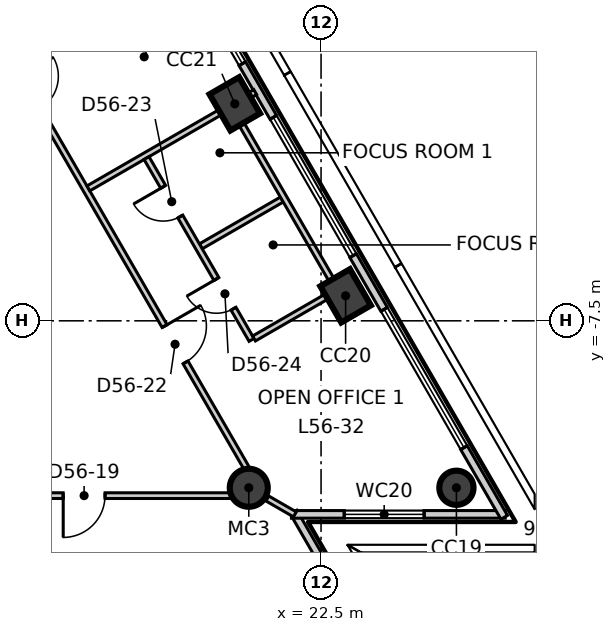
"""IFC4 building model, lengths in metres.
Left out: names, types, materials, properties, quantities, classifications, styles, units other than length and angle.
Written with IfcOpenShell. Run it as: python <this file> out.ifc"""

import sys

from ifc_helpers import new_model, si_unit, direction, frame, frame_2d, origin, origin_2d, place, context, subcontext, project, spatial, rectangle, circle, extrude, element, fill, save


model = new_model("IFC4")
c1 = context("Model", 3, precision=1e-05, world=origin(), true_north=direction((0.0, 1.0)))
c2 = subcontext(c1, "Body", "Model", "MODEL_VIEW")
j1 = project(units=[si_unit("LENGTHUNIT", "METRE"), si_unit("PLANEANGLEUNIT", "RADIAN")], contexts=[c1])
p1 = place(None, origin())
s1 = spatial("IfcSite", under=j1, at=p1, CompositionType="ELEMENT")
p2 = place(p1, origin())
s2 = spatial("IfcBuilding", under=s1, at=p2, CompositionType="ELEMENT")
p3 = place(p2, frame((0.0, 0.0, 239.3)))
s3 = spatial("IfcBuildingStorey", under=s2, at=p3, CompositionType="ELEMENT", Elevation=239.3)
p4 = place(p3, frame((26.062, -11.893, -0.3), z_axis=(0.0, 0.0, 1.0), x_axis=(-0.5, 0.866025403784, 0.0)))
e1 = element("IfcColumn", 1, at=p4, inside=s3, PredefinedType="COLUMN", context=c2, shape_type="SweptSolid", body=[
    extrude(circle(Radius=0.45, at=origin_2d()), origin(), (0.0, 0.0, 1.0), 4.0),
])
for number, where, z_axis, x_axis in (
    (2, (23.146, -6.842, -0.3), (0.0, 0.0, 1.0), (-0.5, 0.866, 0.0)),
    (3, (20.23, -1.791, -0.3), (0.0, 0.0, 1.0), (-0.5, 0.866, 0.0)),
):
    element("IfcColumn", number, at=place(p3, frame(where, z_axis=z_axis, x_axis=x_axis)), inside=s3, PredefinedType="COLUMN", context=c2, shape_type="SweptSolid", body=[
        extrude(rectangle(XDim=1.1, YDim=0.9, at=origin_2d()), origin(), (0.0, 0.0, 1.0), 4.0),
    ])
p5 = place(p3, frame((20.598, -11.893, -0.3), z_axis=(0.0, 0.0, 1.0), x_axis=(1.0, 0.0, 0.0)))
e4 = element("IfcColumn", 4, at=p5, inside=s3, PredefinedType="COLUMN", context=c2, shape_type="SweptSolid", body=[
    extrude(circle(Radius=0.5, at=origin_2d()), origin(), (0.0, 0.0, 1.0), 4.0),
])
p6 = place(p3, frame((24.588, -17.402, 0.0), z_axis=(0.0, 0.0, 1.0), x_axis=(-0.500033107516, 0.866006288307, 0.0)))
e5 = element("IfcWall", 5, at=p6, inside=s3, PredefinedType="ELEMENTEDWALL", context=c2, shape_type="SweptSolid", body=[
    extrude(rectangle(XDim=5.624, YDim=0.2, at=frame_2d((2.812, 0.0))), origin(), (0.0, 0.0, 1.0), 3.7),
])
p7 = place(p6, frame((1.99, 0.0, 0.9)))
e6 = element("IfcOpeningElement", 6, at=p7, cuts=e5, PredefinedType="OPENING", context=c2, shape_type="SweptSolid", body=[
    extrude(rectangle(XDim=2.1, YDim=2.5, at=frame_2d((1.05, 1.25))), frame((0.0, 0.11, 0.0), z_axis=(0.0, -1.0, 0.0), x_axis=(1.0, 0.0, 0.0)), (0.0, 0.0, 1.0), 0.22),
])
p8 = place(p3, frame((21.721, -12.593, 0.0), z_axis=(0.0, 0.0, 1.0), x_axis=(1.0, 0.0, 0.0)))
e7 = element("IfcWall", 7, at=p8, inside=s3, PredefinedType="ELEMENTEDWALL", context=c2, shape_type="SweptSolid", body=[
    extrude(rectangle(XDim=5.624, YDim=0.2, at=frame_2d((2.812, 0.0))), origin(), (0.0, 0.0, 1.0), 3.7),
])
p9 = place(p8, frame((1.39, 0.0, 0.9)))
e8 = element("IfcOpeningElement", 8, at=p9, cuts=e7, PredefinedType="OPENING", context=c2, shape_type="SweptSolid", body=[
    extrude(rectangle(XDim=2.1, YDim=2.5, at=frame_2d((1.05, 1.25))), frame((0.0, 0.11, 0.0), z_axis=(0.0, -1.0, 0.0), x_axis=(1.0, 0.0, 0.0)), (0.0, 0.0, 1.0), 0.22),
])
p10 = place(p3, frame((27.32, -12.671, 0.0), z_axis=(0.0, 0.0, 1.0), x_axis=(-0.499995097538, 0.866028234204, 0.0)))
e9 = element("IfcWall", 9, at=p10, inside=s3, PredefinedType="ELEMENTEDWALL", context=c2, shape_type="SweptSolid", body=[
    extrude(rectangle(XDim=49.247, YDim=0.2, at=frame_2d((24.623, 0.0))), origin(), (0.0, 0.0, 1.0), 3.7),
])
p11 = place(p10, frame((2.119, 0.0, 0.9)))
e10 = element("IfcOpeningElement", 10, at=p11, cuts=e9, PredefinedType="OPENING", context=c2, shape_type="SweptSolid", body=[
    extrude(rectangle(XDim=4.2, YDim=2.5, at=frame_2d((2.1, 1.25))), frame((0.0, 0.11, 0.0), z_axis=(0.0, -1.0, 0.0), x_axis=(1.0, 0.0, 0.0)), (0.0, 0.0, 1.0), 0.22),
])
p12 = place(p10, frame((7.952, 0.0, 0.9)))
e11 = element("IfcOpeningElement", 11, at=p12, cuts=e9, PredefinedType="OPENING", context=c2, shape_type="SweptSolid", body=[
    extrude(rectangle(XDim=4.2, YDim=2.5, at=frame_2d((2.1, 1.25))), frame((0.0, 0.11, 0.0), z_axis=(0.0, -1.0, 0.0), x_axis=(1.0, 0.0, 0.0)), (0.0, 0.0, 1.0), 0.22),
])
p13 = place(p10, frame((13.784, 0.0, 0.9)))
e12 = element("IfcOpeningElement", 12, at=p13, cuts=e9, PredefinedType="OPENING", context=c2, shape_type="SweptSolid", body=[
    extrude(rectangle(XDim=4.2, YDim=2.5, at=frame_2d((2.1, 1.25))), frame((0.0, 0.11, 0.0), z_axis=(0.0, -1.0, 0.0), x_axis=(1.0, 0.0, 0.0)), (0.0, 0.0, 1.0), 0.22),
])
p14 = place(p10, frame((19.617, 0.0, 0.9)))
e13 = element("IfcOpeningElement", 13, at=p14, cuts=e9, PredefinedType="OPENING", context=c2, shape_type="SweptSolid", body=[
    extrude(rectangle(XDim=4.2, YDim=2.5, at=frame_2d((2.1, 1.25))), frame((0.0, 0.11, 0.0), z_axis=(0.0, -1.0, 0.0), x_axis=(1.0, 0.0, 0.0)), (0.0, 0.0, 1.0), 0.22),
])
p15 = place(p10, frame((25.45, 0.0, 0.9)))
e14 = element("IfcOpeningElement", 14, at=p15, cuts=e9, PredefinedType="OPENING", context=c2, shape_type="SweptSolid", body=[
    extrude(rectangle(XDim=4.2, YDim=2.5, at=frame_2d((2.1, 1.25))), frame((0.0, 0.11, 0.0), z_axis=(0.0, -1.0, 0.0), x_axis=(1.0, 0.0, 0.0)), (0.0, 0.0, 1.0), 0.22),
])
p16 = place(p10, frame((31.282, 0.0, 0.9)))
e15 = element("IfcOpeningElement", 15, at=p16, cuts=e9, PredefinedType="OPENING", context=c2, shape_type="SweptSolid", body=[
    extrude(rectangle(XDim=4.2, YDim=2.5, at=frame_2d((2.1, 1.25))), frame((0.0, 0.11, 0.0), z_axis=(0.0, -1.0, 0.0), x_axis=(1.0, 0.0, 0.0)), (0.0, 0.0, 1.0), 0.22),
])
p17 = place(p10, frame((37.115, 0.0, 0.9)))
e16 = element("IfcOpeningElement", 16, at=p17, cuts=e9, PredefinedType="OPENING", context=c2, shape_type="SweptSolid", body=[
    extrude(rectangle(XDim=4.2, YDim=2.5, at=frame_2d((2.1, 1.25))), frame((0.0, 0.11, 0.0), z_axis=(0.0, -1.0, 0.0), x_axis=(1.0, 0.0, 0.0)), (0.0, 0.0, 1.0), 0.22),
])
p18 = place(p10, frame((42.947, 0.0, 0.9)))
e17 = element("IfcOpeningElement", 17, at=p18, cuts=e9, PredefinedType="OPENING", context=c2, shape_type="SweptSolid", body=[
    extrude(rectangle(XDim=4.2, YDim=2.5, at=frame_2d((2.1, 1.25))), frame((0.0, 0.11, 0.0), z_axis=(0.0, -1.0, 0.0), x_axis=(1.0, 0.0, 0.0)), (0.0, 0.0, 1.0), 0.22),
])
p19 = place(p3, frame((-20.807, -12.1, 0.0), z_axis=(0.0, 0.0, 1.0), x_axis=(1.0, 0.0, 0.0)))
e18 = element("IfcWall", 18, at=p19, inside=s3, PredefinedType="PARTITIONING", context=c2, shape_type="SweptSolid", body=[
    extrude(rectangle(XDim=41.764, YDim=0.15, at=frame_2d((20.882, 0.0))), origin(), (0.0, 0.0, 1.0), 3.7),
])
p20 = place(p19, frame((3.9, 0.0, 0.0)))
e19 = element("IfcOpeningElement", 19, at=p20, cuts=e18, PredefinedType="OPENING", context=c2, shape_type="SweptSolid", body=[
    extrude(rectangle(XDim=1.1, YDim=2.1, at=frame_2d((0.55, 1.05))), frame((0.0, 0.085, 0.0), z_axis=(0.0, -1.0, 0.0), x_axis=(1.0, 0.0, 0.0)), (0.0, 0.0, 1.0), 0.17),
])
p21 = place(p19, frame((18.792, 0.0, 0.0)))
e20 = element("IfcOpeningElement", 20, at=p21, cuts=e18, PredefinedType="OPENING", context=c2, shape_type="SweptSolid", body=[
    extrude(rectangle(XDim=1.1, YDim=2.1, at=frame_2d((0.55, 1.05))), frame((0.0, 0.085, 0.0), z_axis=(0.0, -1.0, 0.0), x_axis=(1.0, 0.0, 0.0)), (0.0, 0.0, 1.0), 0.17),
])
p22 = place(p19, frame((10.292, 0.0, 0.0)))
e21 = element("IfcOpeningElement", 21, at=p22, cuts=e18, PredefinedType="OPENING", context=c2, shape_type="SweptSolid", body=[
    extrude(rectangle(XDim=0.9, YDim=2.1, at=frame_2d((0.45, 1.05))), frame((0.0, 0.085, 0.0), z_axis=(0.0, -1.0, 0.0), x_axis=(1.0, 0.0, 0.0)), (0.0, 0.0, 1.0), 0.17),
])
p23 = place(p19, frame((13.492, 0.0, 0.0)))
e22 = element("IfcOpeningElement", 22, at=p23, cuts=e18, PredefinedType="OPENING", context=c2, shape_type="SweptSolid", body=[
    extrude(rectangle(XDim=0.9, YDim=2.1, at=frame_2d((0.45, 1.05))), frame((0.0, 0.085, 0.0), z_axis=(0.0, -1.0, 0.0), x_axis=(1.0, 0.0, 0.0)), (0.0, 0.0, 1.0), 0.17),
])
p24 = place(p19, frame((16.292, 0.0, 0.0)))
e23 = element("IfcOpeningElement", 23, at=p24, cuts=e18, PredefinedType="OPENING", context=c2, shape_type="SweptSolid", body=[
    extrude(rectangle(XDim=1.0, YDim=2.1, at=frame_2d((0.5, 1.05))), frame((0.0, 0.085, 0.0), z_axis=(0.0, -1.0, 0.0), x_axis=(1.0, 0.0, 0.0)), (0.0, 0.0, 1.0), 0.17),
])
p25 = place(p19, frame((29.057, 0.0, 0.0)))
e24 = element("IfcOpeningElement", 24, at=p25, cuts=e18, PredefinedType="OPENING", context=c2, shape_type="SweptSolid", body=[
    extrude(rectangle(XDim=1.1, YDim=2.1, at=frame_2d((0.55, 1.05))), frame((0.0, 0.085, 0.0), z_axis=(0.0, -1.0, 0.0), x_axis=(1.0, 0.0, 0.0)), (0.0, 0.0, 1.0), 0.17),
])
p26 = place(p19, frame((22.157, 0.0, 0.0)))
e25 = element("IfcOpeningElement", 25, at=p26, cuts=e18, PredefinedType="OPENING", context=c2, shape_type="SweptSolid", body=[
    extrude(rectangle(XDim=0.9, YDim=2.1, at=frame_2d((0.45, 1.05))), frame((0.0, 0.085, 0.0), z_axis=(0.0, -1.0, 0.0), x_axis=(1.0, 0.0, 0.0)), (0.0, 0.0, 1.0), 0.17),
])
p27 = place(p19, frame((25.157, 0.0, 0.0)))
e26 = element("IfcOpeningElement", 26, at=p27, cuts=e18, PredefinedType="OPENING", context=c2, shape_type="SweptSolid", body=[
    extrude(rectangle(XDim=0.9, YDim=2.1, at=frame_2d((0.45, 1.05))), frame((0.0, 0.085, 0.0), z_axis=(0.0, -1.0, 0.0), x_axis=(1.0, 0.0, 0.0)), (0.0, 0.0, 1.0), 0.17),
])
p28 = place(p19, frame((36.522, 0.0, 0.0)))
e27 = element("IfcOpeningElement", 27, at=p28, cuts=e18, PredefinedType="OPENING", context=c2, shape_type="SweptSolid", body=[
    extrude(rectangle(XDim=1.1, YDim=2.1, at=frame_2d((0.55, 1.05))), frame((0.0, 0.085, 0.0), z_axis=(0.0, -1.0, 0.0), x_axis=(1.0, 0.0, 0.0)), (0.0, 0.0, 1.0), 0.17),
])
p29 = place(p3, frame((21.087, -12.175, 0.0), z_axis=(0.0, 0.0, 1.0), x_axis=(0.866078617559, -0.49990781971, 0.0)))
e28 = element("IfcWall", 28, at=p29, inside=s3, PredefinedType="PARTITIONING", context=c2, shape_type="SweptSolid", body=[
    extrude(rectangle(XDim=0.836, YDim=0.15, at=frame_2d((0.418, 0.0))), origin(), (0.0, 0.0, 1.0), 3.7),
])
p30 = place(p3, frame((0.075, 24.07, 0.0), z_axis=(0.0, 0.0, 1.0), x_axis=(0.500006834213, -0.866021458014, 0.0)))
e29 = element("IfcWall", 29, at=p30, inside=s3, PredefinedType="PARTITIONING", context=c2, shape_type="SweptSolid", body=[
    extrude(rectangle(XDim=41.616, YDim=0.15, at=frame_2d((20.808, 0.0))), origin(), (0.0, 0.0, 1.0), 3.7),
])
p31 = place(p30, frame((36.616, 0.0, 0.0)))
e30 = element("IfcOpeningElement", 30, at=p31, cuts=e29, PredefinedType="OPENING", context=c2, shape_type="SweptSolid", body=[
    extrude(rectangle(XDim=1.1, YDim=2.1, at=frame_2d((0.55, 1.05))), frame((0.0, 0.085, 0.0), z_axis=(0.0, -1.0, 0.0), x_axis=(1.0, 0.0, 0.0)), (0.0, 0.0, 1.0), 0.17),
])
p32 = place(p30, frame((29.024, 0.0, 0.0)))
e31 = element("IfcOpeningElement", 31, at=p32, cuts=e29, PredefinedType="OPENING", context=c2, shape_type="SweptSolid", body=[
    extrude(rectangle(XDim=1.0, YDim=2.1, at=frame_2d((0.5, 1.05))), frame((0.0, 0.085, 0.0), z_axis=(0.0, -1.0, 0.0), x_axis=(1.0, 0.0, 0.0)), (0.0, 0.0, 1.0), 0.17),
])
p33 = place(p30, frame((23.19, 0.0, 0.0)))
e32 = element("IfcOpeningElement", 32, at=p33, cuts=e29, PredefinedType="OPENING", context=c2, shape_type="SweptSolid", body=[
    extrude(rectangle(XDim=1.0, YDim=2.1, at=frame_2d((0.5, 1.05))), frame((0.0, 0.085, 0.0), z_axis=(0.0, -1.0, 0.0), x_axis=(1.0, 0.0, 0.0)), (0.0, 0.0, 1.0), 0.17),
])
p34 = place(p30, frame((14.458, 0.0, 0.0)))
e33 = element("IfcOpeningElement", 33, at=p34, cuts=e29, PredefinedType="OPENING", context=c2, shape_type="SweptSolid", body=[
    extrude(rectangle(XDim=1.1, YDim=2.1, at=frame_2d((0.55, 1.05))), frame((0.0, 0.085, 0.0), z_axis=(0.0, -1.0, 0.0), x_axis=(1.0, 0.0, 0.0)), (0.0, 0.0, 1.0), 0.17),
])
p35 = place(p30, frame((3.993, 0.0, 0.0)))
e34 = element("IfcOpeningElement", 34, at=p35, cuts=e29, PredefinedType="OPENING", context=c2, shape_type="SweptSolid", body=[
    extrude(rectangle(XDim=1.1, YDim=2.1, at=frame_2d((0.55, 1.05))), frame((0.0, 0.085, 0.0), z_axis=(0.0, -1.0, 0.0), x_axis=(1.0, 0.0, 0.0)), (0.0, 0.0, 1.0), 0.17),
])
p36 = place(p3, frame((16.377, -4.016, 0.0), z_axis=(0.0, 0.0, 1.0), x_axis=(0.86598187042, 0.500075394419, 0.0)))
e35 = element("IfcWall", 35, at=p36, inside=s3, PredefinedType="PARTITIONING", context=c2, shape_type="SweptSolid", body=[
    extrude(rectangle(XDim=5.07, YDim=0.15, at=frame_2d((2.535, 0.0))), origin(), (0.0, 0.0, 1.0), 3.7),
])
p37 = place(p3, frame((19.336, -5.54, 0.0), z_axis=(0.0, 0.0, 1.0), x_axis=(0.866025399526, 0.500000007376, 0.0)))
e36 = element("IfcWall", 36, at=p37, inside=s3, PredefinedType="PARTITIONING", context=c2, shape_type="SweptSolid", body=[
    extrude(rectangle(XDim=2.462, YDim=0.15, at=frame_2d((1.231, 0.0))), origin(), (0.0, 0.0, 1.0), 3.7),
])
p38 = place(p3, frame((20.17, -1.912, 0.0), z_axis=(0.0, 0.0, 1.0), x_axis=(0.500083244257, -0.865977337356, 0.0)))
e37 = element("IfcWall", 37, at=p38, inside=s3, PredefinedType="PARTITIONING", context=c2, shape_type="SweptSolid", body=[
    extrude(rectangle(XDim=5.525, YDim=0.15, at=frame_2d((2.763, 0.0))), origin(), (0.0, 0.0, 1.0), 2.95),
])
p39 = place(p3, frame((17.908, -3.218, 0.0), z_axis=(0.0, 0.0, 1.0), x_axis=(0.500050108258, -0.865996471835, 0.0)))
e38 = element("IfcWall", 38, at=p39, inside=s3, PredefinedType="PARTITIONING", context=c2, shape_type="SweptSolid", body=[
    extrude(rectangle(XDim=5.525, YDim=0.15, at=frame_2d((2.763, 0.0))), origin(), (0.0, 0.0, 1.0), 3.7),
])
p40 = place(p39, frame((0.875, 0.0, 0.0)))
e39 = element("IfcOpeningElement", 39, at=p40, cuts=e38, PredefinedType="OPENING", context=c2, shape_type="SweptSolid", body=[
    extrude(rectangle(XDim=0.9, YDim=2.1, at=frame_2d((0.45, 1.05))), frame((0.0, 0.085, 0.0), z_axis=(0.0, -1.0, 0.0), x_axis=(1.0, 0.0, 0.0)), (0.0, 0.0, 1.0), 0.17),
])
p41 = place(p39, frame((3.675, 0.0, 0.0)))
e40 = element("IfcOpeningElement", 40, at=p41, cuts=e38, PredefinedType="OPENING", context=c2, shape_type="SweptSolid", body=[
    extrude(rectangle(XDim=0.9, YDim=2.1, at=frame_2d((0.45, 1.05))), frame((0.0, 0.085, 0.0), z_axis=(0.0, -1.0, 0.0), x_axis=(1.0, 0.0, 0.0)), (0.0, 0.0, 1.0), 0.17),
])
p42 = place(p3, frame((20.736, -7.965, 0.0), z_axis=(0.0, 0.0, 1.0), x_axis=(0.865957656801, 0.500117322864, 0.0)))
e41 = element("IfcWall", 41, at=p42, inside=s3, PredefinedType="PARTITIONING", context=c2, shape_type="SweptSolid", body=[
    extrude(rectangle(XDim=2.462, YDim=0.15, at=frame_2d((1.231, 0.0))), origin(), (0.0, 0.0, 1.0), 3.7),
])
p43 = place(p9, origin())
e42 = element("IfcWindow", 42, at=p43, inside=s3, PartitioningType="SINGLE_PANEL", PredefinedType="WINDOW", context=c2, shape_type="SweptSolid", body=[
    extrude(rectangle(XDim=2.1, YDim=2.5, at=frame_2d((1.05, 1.25))), frame((0.0, 0.03, 0.0), z_axis=(0.0, -1.0, 0.0), x_axis=(1.0, 0.0, 0.0)), (0.0, 0.0, 1.0), 0.06),
])
fill(e8, e42)
p44 = place(p11, origin())
e43 = element("IfcWindow", 43, at=p44, inside=s3, PartitioningType="SINGLE_PANEL", PredefinedType="WINDOW", context=c2, shape_type="SweptSolid", body=[
    extrude(rectangle(XDim=4.2, YDim=2.5, at=frame_2d((2.1, 1.25))), frame((0.0, 0.03, 0.0), z_axis=(0.0, -1.0, 0.0), x_axis=(1.0, 0.0, 0.0)), (0.0, 0.0, 1.0), 0.06),
])
fill(e10, e43)
p45 = place(p12, origin())
e44 = element("IfcWindow", 44, at=p45, inside=s3, PartitioningType="SINGLE_PANEL", PredefinedType="WINDOW", context=c2, shape_type="SweptSolid", body=[
    extrude(rectangle(XDim=4.2, YDim=2.5, at=frame_2d((2.1, 1.25))), frame((0.0, 0.03, 0.0), z_axis=(0.0, -1.0, 0.0), x_axis=(1.0, 0.0, 0.0)), (0.0, 0.0, 1.0), 0.06),
])
fill(e11, e44)
p46 = place(p13, origin())
e45 = element("IfcWindow", 45, at=p46, inside=s3, PartitioningType="SINGLE_PANEL", PredefinedType="WINDOW", context=c2, shape_type="SweptSolid", body=[
    extrude(rectangle(XDim=4.2, YDim=2.5, at=frame_2d((2.1, 1.25))), frame((0.0, 0.03, 0.0), z_axis=(0.0, -1.0, 0.0), x_axis=(1.0, 0.0, 0.0)), (0.0, 0.0, 1.0), 0.06),
])
fill(e12, e45)
p47 = place(p28, origin())
e46 = element("IfcDoor", 46, at=p47, inside=s3, OperationType="SINGLE_SWING_LEFT", PredefinedType="DOOR", context=c2, shape_type="SweptSolid", body=[
    extrude(rectangle(XDim=1.1, YDim=2.1, at=frame_2d((0.55, 1.05))), frame((0.0, 0.025, 0.0), z_axis=(0.0, -1.0, 0.0), x_axis=(1.0, 0.0, 0.0)), (0.0, 0.0, 1.0), 0.05),
])
fill(e27, e46)
p48 = place(p31, origin())
e47 = element("IfcDoor", 47, at=p48, inside=s3, OperationType="SINGLE_SWING_RIGHT", PredefinedType="DOOR", context=c2, shape_type="SweptSolid", body=[
    extrude(rectangle(XDim=1.1, YDim=2.1, at=frame_2d((0.55, 1.05))), frame((0.0, 0.025, 0.0), z_axis=(0.0, -1.0, 0.0), x_axis=(1.0, 0.0, 0.0)), (0.0, 0.0, 1.0), 0.05),
])
fill(e30, e47)
p49 = place(p40, origin())
e48 = element("IfcDoor", 48, at=p49, inside=s3, OperationType="SINGLE_SWING_LEFT", PredefinedType="DOOR", context=c2, shape_type="SweptSolid", body=[
    extrude(rectangle(XDim=0.9, YDim=2.1, at=frame_2d((0.45, 1.05))), frame((0.0, 0.025, 0.0), z_axis=(0.0, -1.0, 0.0), x_axis=(1.0, 0.0, 0.0)), (0.0, 0.0, 1.0), 0.05),
])
fill(e39, e48)
p50 = place(p41, origin())
e49 = element("IfcDoor", 49, at=p50, inside=s3, OperationType="SINGLE_SWING_LEFT", PredefinedType="DOOR", context=c2, shape_type="SweptSolid", body=[
    extrude(rectangle(XDim=0.9, YDim=2.1, at=frame_2d((0.45, 1.05))), frame((0.0, 0.025, 0.0), z_axis=(0.0, -1.0, 0.0), x_axis=(1.0, 0.0, 0.0)), (0.0, 0.0, 1.0), 0.05),
])
fill(e40, e49)
save(model, sys.argv[1])
